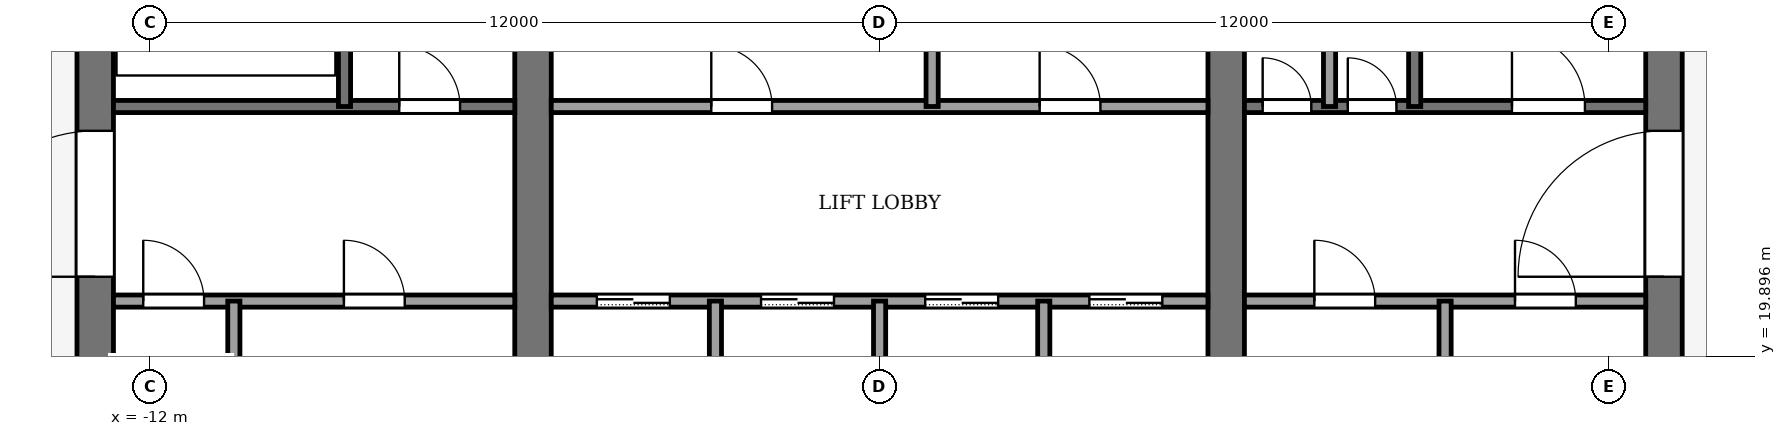
"""IFC4 building model, lengths in metres.
Left out: names, types, materials, properties, quantities, classifications, styles, units other than length and angle.
Written with IfcOpenShell. Run it as: python <this file> out.ifc"""

import sys

from ifc_helpers import new_model, si_unit, direction, frame, frame_2d, origin, place, context, subcontext, project, spatial, rectangle, extrude, element, fill, save


model = new_model("IFC4")
c1 = context("Model", 3, precision=1e-05, world=origin(), true_north=direction((0.0, 1.0)))
c2 = subcontext(c1, "Body", "Model", "MODEL_VIEW")
j1 = project(units=[si_unit("LENGTHUNIT", "METRE"), si_unit("PLANEANGLEUNIT", "RADIAN")], contexts=[c1])
p1 = place(None, origin())
s1 = spatial("IfcSite", under=j1, at=p1, CompositionType="ELEMENT")
p2 = place(p1, origin())
s2 = spatial("IfcBuilding", under=s1, at=p2, CompositionType="ELEMENT")
p3 = place(p2, frame((0.0, 0.0, 289.0)))
s3 = spatial("IfcBuildingStorey", under=s2, at=p3, CompositionType="ELEMENT", Elevation=289.0)
p4 = place(p3, frame((-12.9, 18.4, -0.13), z_axis=(0.0, 0.0, 1.0), x_axis=(0.0, 1.0, 0.0)))
e1 = element("IfcWall", 1, at=p4, inside=s3, PredefinedType="SHEAR", context=c2, shape_type="SweptSolid", body=[
    extrude(rectangle(XDim=19.2, YDim=0.6, at=frame_2d((9.6, 0.0))), origin(), (0.0, 0.0, 1.0), 5.0),
])
p5 = place(p4, frame((2.8, 0.0, 0.13)))
e2 = element("IfcOpeningElement", 2, at=p5, cuts=e1, PredefinedType="OPENING", context=c2, shape_type="SweptSolid", body=[
    extrude(rectangle(XDim=2.4, YDim=2.4, at=frame_2d((1.2, 1.2))), frame((0.0, 0.31, 0.0), z_axis=(0.0, -1.0, 0.0), x_axis=(1.0, 0.0, 0.0)), (0.0, 0.0, 1.0), 0.62),
])
p6 = place(p4, frame((13.4, 0.0, 0.13)))
e3 = element("IfcOpeningElement", 3, at=p6, cuts=e1, PredefinedType="OPENING", context=c2, shape_type="SweptSolid", body=[
    extrude(rectangle(XDim=1.4, YDim=2.2, at=frame_2d((0.7, 1.1))), frame((0.0, 0.31, 0.0), z_axis=(0.0, -1.0, 0.0), x_axis=(1.0, 0.0, 0.0)), (0.0, 0.0, 1.0), 0.62),
])
p7 = place(p3, frame((12.9, 18.4, -0.13), z_axis=(0.0, 0.0, 1.0), x_axis=(0.0, 1.0, 0.0)))
e4 = element("IfcWall", 4, at=p7, inside=s3, PredefinedType="SHEAR", context=c2, shape_type="SweptSolid", body=[
    extrude(rectangle(XDim=19.2, YDim=0.6, at=frame_2d((9.6, 0.0))), origin(), (0.0, 0.0, 1.0), 5.0),
])
p8 = place(p7, frame((2.8, 0.0, 0.13)))
e5 = element("IfcOpeningElement", 5, at=p8, cuts=e4, PredefinedType="OPENING", context=c2, shape_type="SweptSolid", body=[
    extrude(rectangle(XDim=2.4, YDim=2.4, at=frame_2d((1.2, 1.2))), frame((0.0, 0.31, 0.0), z_axis=(0.0, -1.0, 0.0), x_axis=(1.0, 0.0, 0.0)), (0.0, 0.0, 1.0), 0.62),
])
p9 = place(p7, frame((13.3, 0.0, 0.13)))
e6 = element("IfcOpeningElement", 6, at=p9, cuts=e4, PredefinedType="OPENING", context=c2, shape_type="SweptSolid", body=[
    extrude(rectangle(XDim=2.4, YDim=2.4, at=frame_2d((1.2, 1.2))), frame((0.0, 0.31, 0.0), z_axis=(0.0, -1.0, 0.0), x_axis=(1.0, 0.0, 0.0)), (0.0, 0.0, 1.0), 0.62),
])
p10 = place(p3, frame((-5.7, 18.4, -0.13), z_axis=(0.0, 0.0, 1.0), x_axis=(0.0, 1.0, 0.0)))
e7 = element("IfcWall", 7, at=p10, inside=s3, PredefinedType="SHEAR", context=c2, shape_type="SweptSolid", body=[
    extrude(rectangle(XDim=19.2, YDim=0.6, at=frame_2d((9.6, 0.0))), origin(), (0.0, 0.0, 1.0), 5.0),
])
p11 = place(p10, frame((8.35, 0.0, 0.13)))
e8 = element("IfcOpeningElement", 8, at=p11, cuts=e7, PredefinedType="OPENING", context=c2, shape_type="SweptSolid", body=[
    extrude(rectangle(XDim=0.9, YDim=2.1, at=frame_2d((0.45, 1.05))), frame((0.0, 0.31, 0.0), z_axis=(0.0, -1.0, 0.0), x_axis=(1.0, 0.0, 0.0)), (0.0, 0.0, 1.0), 0.62),
])
p12 = place(p3, frame((5.7, 18.4, -0.13), z_axis=(0.0, 0.0, 1.0), x_axis=(0.0, 1.0, 0.0)))
e9 = element("IfcWall", 9, at=p12, inside=s3, PredefinedType="SHEAR", context=c2, shape_type="SweptSolid", body=[
    extrude(rectangle(XDim=19.2, YDim=0.6, at=frame_2d((9.6, 0.0))), origin(), (0.0, 0.0, 1.0), 5.0),
])
p13 = place(p12, frame((13.3, 0.0, 0.13)))
e10 = element("IfcOpeningElement", 10, at=p13, cuts=e9, PredefinedType="OPENING", context=c2, shape_type="SweptSolid", body=[
    extrude(rectangle(XDim=2.4, YDim=2.4, at=frame_2d((1.2, 1.2))), frame((0.0, 0.31, 0.0), z_axis=(0.0, -1.0, 0.0), x_axis=(1.0, 0.0, 0.0)), (0.0, 0.0, 1.0), 0.62),
])
p14 = place(p3, frame((-12.6, 20.8, 0.0), z_axis=(0.0, 0.0, 1.0), x_axis=(1.0, 0.0, 0.0)))
e11 = element("IfcWall", 11, at=p14, inside=s3, PredefinedType="PARTITIONING", context=c2, shape_type="SweptSolid", body=[
    extrude(rectangle(XDim=6.6, YDim=0.2, at=frame_2d((3.3, 0.0))), origin(), (0.0, 0.0, 1.0), 4.87),
])
p15 = place(p14, frame((0.49, 0.0, 0.0)))
e12 = element("IfcOpeningElement", 12, at=p15, cuts=e11, PredefinedType="OPENING", context=c2, shape_type="SweptSolid", body=[
    extrude(rectangle(XDim=1.0, YDim=2.1, at=frame_2d((0.5, 1.05))), frame((0.0, 0.11, 0.0), z_axis=(0.0, -1.0, 0.0), x_axis=(1.0, 0.0, 0.0)), (0.0, 0.0, 1.0), 0.22),
])
p16 = place(p14, frame((3.79, 0.0, 0.0)))
e13 = element("IfcOpeningElement", 13, at=p16, cuts=e11, PredefinedType="OPENING", context=c2, shape_type="SweptSolid", body=[
    extrude(rectangle(XDim=1.0, YDim=2.1, at=frame_2d((0.5, 1.05))), frame((0.0, 0.11, 0.0), z_axis=(0.0, -1.0, 0.0), x_axis=(1.0, 0.0, 0.0)), (0.0, 0.0, 1.0), 0.22),
])
p17 = place(p3, frame((-5.4, 20.8, 0.0), z_axis=(0.0, 0.0, 1.0), x_axis=(1.0, 0.0, 0.0)))
e14 = element("IfcWall", 14, at=p17, inside=s3, PredefinedType="PARTITIONING", context=c2, shape_type="SweptSolid", body=[
    extrude(rectangle(XDim=10.8, YDim=0.2, at=frame_2d((5.4, 0.0))), origin(), (0.0, 0.0, 1.0), 4.87),
])
p18 = place(p17, frame((0.75, 0.0, 0.0)))
e15 = element("IfcOpeningElement", 15, at=p18, cuts=e14, PredefinedType="OPENING", context=c2, shape_type="SweptSolid", body=[
    extrude(rectangle(XDim=1.2, YDim=2.2, at=frame_2d((0.6, 1.1))), frame((0.0, 0.11, 0.0), z_axis=(0.0, -1.0, 0.0), x_axis=(1.0, 0.0, 0.0)), (0.0, 0.0, 1.0), 0.22),
])
p19 = place(p17, frame((3.45, 0.0, 0.0)))
e16 = element("IfcOpeningElement", 16, at=p19, cuts=e14, PredefinedType="OPENING", context=c2, shape_type="SweptSolid", body=[
    extrude(rectangle(XDim=1.2, YDim=2.2, at=frame_2d((0.6, 1.1))), frame((0.0, 0.11, 0.0), z_axis=(0.0, -1.0, 0.0), x_axis=(1.0, 0.0, 0.0)), (0.0, 0.0, 1.0), 0.22),
])
p20 = place(p17, frame((6.15, 0.0, 0.0)))
e17 = element("IfcOpeningElement", 17, at=p20, cuts=e14, PredefinedType="OPENING", context=c2, shape_type="SweptSolid", body=[
    extrude(rectangle(XDim=1.2, YDim=2.2, at=frame_2d((0.6, 1.1))), frame((0.0, 0.11, 0.0), z_axis=(0.0, -1.0, 0.0), x_axis=(1.0, 0.0, 0.0)), (0.0, 0.0, 1.0), 0.22),
])
p21 = place(p17, frame((8.85, 0.0, 0.0)))
e18 = element("IfcOpeningElement", 18, at=p21, cuts=e14, PredefinedType="OPENING", context=c2, shape_type="SweptSolid", body=[
    extrude(rectangle(XDim=1.2, YDim=2.2, at=frame_2d((0.6, 1.1))), frame((0.0, 0.11, 0.0), z_axis=(0.0, -1.0, 0.0), x_axis=(1.0, 0.0, 0.0)), (0.0, 0.0, 1.0), 0.22),
])
p22 = place(p3, frame((6.0, 20.8, 0.0), z_axis=(0.0, 0.0, 1.0), x_axis=(1.0, 0.0, 0.0)))
e19 = element("IfcWall", 19, at=p22, inside=s3, PredefinedType="PARTITIONING", context=c2, shape_type="SweptSolid", body=[
    extrude(rectangle(XDim=6.6, YDim=0.2, at=frame_2d((3.3, 0.0))), origin(), (0.0, 0.0, 1.0), 4.87),
])
p23 = place(p22, frame((1.15, 0.0, 0.0)))
e20 = element("IfcOpeningElement", 20, at=p23, cuts=e19, PredefinedType="OPENING", context=c2, shape_type="SweptSolid", body=[
    extrude(rectangle(XDim=1.0, YDim=2.1, at=frame_2d((0.5, 1.05))), frame((0.0, 0.11, 0.0), z_axis=(0.0, -1.0, 0.0), x_axis=(1.0, 0.0, 0.0)), (0.0, 0.0, 1.0), 0.22),
])
p24 = place(p22, frame((4.45, 0.0, 0.0)))
e21 = element("IfcOpeningElement", 21, at=p24, cuts=e19, PredefinedType="OPENING", context=c2, shape_type="SweptSolid", body=[
    extrude(rectangle(XDim=1.0, YDim=2.1, at=frame_2d((0.5, 1.05))), frame((0.0, 0.11, 0.0), z_axis=(0.0, -1.0, 0.0), x_axis=(1.0, 0.0, 0.0)), (0.0, 0.0, 1.0), 0.22),
])
p25 = place(p3, frame((-12.6, 24.0, 0.0), z_axis=(0.0, 0.0, 1.0), x_axis=(1.0, 0.0, 0.0)))
e22 = element("IfcWall", 22, at=p25, inside=s3, PredefinedType="PARTITIONING", context=c2, shape_type="SweptSolid", body=[
    extrude(rectangle(XDim=6.6, YDim=0.2, at=frame_2d((3.3, 0.0))), origin(), (0.0, 0.0, 1.0), 4.87),
])
p26 = place(p25, frame((4.7, 0.0, 0.0)))
e23 = element("IfcOpeningElement", 23, at=p26, cuts=e22, PredefinedType="OPENING", context=c2, shape_type="SweptSolid", body=[
    extrude(rectangle(XDim=1.0, YDim=2.1, at=frame_2d((0.5, 1.05))), frame((0.0, 0.11, 0.0), z_axis=(0.0, -1.0, 0.0), x_axis=(1.0, 0.0, 0.0)), (0.0, 0.0, 1.0), 0.22),
])
p27 = place(p3, frame((-5.4, 24.0, 0.0), z_axis=(0.0, 0.0, 1.0), x_axis=(1.0, 0.0, 0.0)))
e24 = element("IfcWall", 24, at=p27, inside=s3, PredefinedType="PARTITIONING", context=c2, shape_type="SweptSolid", body=[
    extrude(rectangle(XDim=10.8, YDim=0.2, at=frame_2d((5.4, 0.0))), origin(), (0.0, 0.0, 1.0), 4.87),
])
p28 = place(p27, frame((2.632, 0.0, 0.0)))
e25 = element("IfcOpeningElement", 25, at=p28, cuts=e24, PredefinedType="OPENING", context=c2, shape_type="SweptSolid", body=[
    extrude(rectangle(XDim=1.0, YDim=2.1, at=frame_2d((0.5, 1.05))), frame((0.0, 0.11, 0.0), z_axis=(0.0, -1.0, 0.0), x_axis=(1.0, 0.0, 0.0)), (0.0, 0.0, 1.0), 0.22),
])
p29 = place(p27, frame((8.032, 0.0, 0.0)))
e26 = element("IfcOpeningElement", 26, at=p29, cuts=e24, PredefinedType="OPENING", context=c2, shape_type="SweptSolid", body=[
    extrude(rectangle(XDim=1.0, YDim=2.1, at=frame_2d((0.5, 1.05))), frame((0.0, 0.11, 0.0), z_axis=(0.0, -1.0, 0.0), x_axis=(1.0, 0.0, 0.0)), (0.0, 0.0, 1.0), 0.22),
])
p30 = place(p3, frame((6.0, 24.0, 0.0), z_axis=(0.0, 0.0, 1.0), x_axis=(1.0, 0.0, 0.0)))
e27 = element("IfcWall", 27, at=p30, inside=s3, PredefinedType="PARTITIONING", context=c2, shape_type="SweptSolid", body=[
    extrude(rectangle(XDim=6.6, YDim=0.2, at=frame_2d((3.3, 0.0))), origin(), (0.0, 0.0, 1.0), 4.87),
])
p31 = place(p30, frame((0.3, 0.0, 0.0)))
e28 = element("IfcOpeningElement", 28, at=p31, cuts=e27, PredefinedType="OPENING", context=c2, shape_type="SweptSolid", body=[
    extrude(rectangle(XDim=0.8, YDim=2.1, at=frame_2d((0.4, 1.05))), frame((0.0, 0.11, 0.0), z_axis=(0.0, -1.0, 0.0), x_axis=(1.0, 0.0, 0.0)), (0.0, 0.0, 1.0), 0.22),
])
p32 = place(p30, frame((1.7, 0.0, 0.0)))
e29 = element("IfcOpeningElement", 29, at=p32, cuts=e27, PredefinedType="OPENING", context=c2, shape_type="SweptSolid", body=[
    extrude(rectangle(XDim=0.8, YDim=2.1, at=frame_2d((0.4, 1.05))), frame((0.0, 0.11, 0.0), z_axis=(0.0, -1.0, 0.0), x_axis=(1.0, 0.0, 0.0)), (0.0, 0.0, 1.0), 0.22),
])
p33 = place(p30, frame((4.4, 0.0, 0.0)))
e30 = element("IfcOpeningElement", 30, at=p33, cuts=e27, PredefinedType="OPENING", context=c2, shape_type="SweptSolid", body=[
    extrude(rectangle(XDim=1.2, YDim=2.2, at=frame_2d((0.6, 1.1))), frame((0.0, 0.11, 0.0), z_axis=(0.0, -1.0, 0.0), x_axis=(1.0, 0.0, 0.0)), (0.0, 0.0, 1.0), 0.22),
])
p34 = place(p3, frame((-10.62, 18.4, 0.0), z_axis=(0.0, 0.0, 1.0), x_axis=(0.0, 1.0, 0.0)))
e31 = element("IfcWall", 31, at=p34, inside=s3, PredefinedType="PARTITIONING", context=c2, shape_type="SweptSolid", body=[
    extrude(rectangle(XDim=2.4, YDim=0.2, at=frame_2d((1.2, 0.0))), origin(), (0.0, 0.0, 1.0), 4.87),
])
p35 = place(p3, frame((-8.8, 24.0, 0.0), z_axis=(0.0, 0.0, 1.0), x_axis=(0.0, 1.0, 0.0)))
e32 = element("IfcWall", 32, at=p35, inside=s3, PredefinedType="PARTITIONING", context=c2, shape_type="SweptSolid", body=[
    extrude(rectangle(XDim=7.4, YDim=0.2, at=frame_2d((3.7, 0.0))), origin(), (0.0, 0.0, 1.0), 4.87),
])
for number, where, z_axis, x_axis in (
    (33, (-2.7, 18.4, 0.0), (0.0, 0.0, 1.0), (0.0, 1.0, 0.0)),
    (34, (0.0, 18.4, 0.0), (0.0, 0.0, 1.0), (0.0, 1.0, 0.0)),
):
    element("IfcWall", number, at=place(p3, frame(where, z_axis=z_axis, x_axis=x_axis)), inside=s3, PredefinedType="PARTITIONING", context=c2, shape_type="SweptSolid", body=[
        extrude(rectangle(XDim=2.4, YDim=0.2, at=frame_2d((1.2, 0.0))), origin(), (0.0, 0.0, 1.0), 4.87),
    ])
p36 = place(p3, frame((0.864, 24.0, 0.0), z_axis=(0.0, 0.0, 1.0), x_axis=(0.0, 1.0, 0.0)))
e35 = element("IfcWall", 35, at=p36, inside=s3, PredefinedType="PARTITIONING", context=c2, shape_type="SweptSolid", body=[
    extrude(rectangle(XDim=2.4, YDim=0.2, at=frame_2d((1.2, 0.0))), origin(), (0.0, 0.0, 1.0), 4.87),
])
p37 = place(p3, frame((2.7, 18.4, 0.0), z_axis=(0.0, 0.0, 1.0), x_axis=(0.0, 1.0, 0.0)))
e36 = element("IfcWall", 36, at=p37, inside=s3, PredefinedType="PARTITIONING", context=c2, shape_type="SweptSolid", body=[
    extrude(rectangle(XDim=2.4, YDim=0.2, at=frame_2d((1.2, 0.0))), origin(), (0.0, 0.0, 1.0), 4.87),
])
for number, where, z_axis, x_axis in (
    (37, (7.4, 24.0, 0.0), (0.0, 0.0, 1.0), (0.0, 1.0, 0.0)),
    (38, (8.8, 24.0, 0.0), (0.0, 0.0, 1.0), (0.0, 1.0, 0.0)),
):
    element("IfcWall", number, at=place(p3, frame(where, z_axis=z_axis, x_axis=x_axis)), inside=s3, PredefinedType="PARTITIONING", context=c2, shape_type="SweptSolid", body=[
        extrude(rectangle(XDim=7.4, YDim=0.2, at=frame_2d((3.7, 0.0))), origin(), (0.0, 0.0, 1.0), 4.87),
    ])
p38 = place(p3, frame((9.3, 18.4, 0.0), z_axis=(0.0, 0.0, 1.0), x_axis=(0.0, 1.0, 0.0)))
e39 = element("IfcWall", 39, at=p38, inside=s3, PredefinedType="PARTITIONING", context=c2, shape_type="SweptSolid", body=[
    extrude(rectangle(XDim=2.4, YDim=0.2, at=frame_2d((1.2, 0.0))), origin(), (0.0, 0.0, 1.0), 4.87),
])
p39 = place(p18, origin())
e40 = element("IfcDoor", 40, at=p39, inside=s3, OperationType="SLIDING_TO_LEFT", PredefinedType="DOOR", context=c2, shape_type="SweptSolid", body=[
    extrude(rectangle(XDim=1.2, YDim=2.2, at=frame_2d((0.6, 1.1))), frame((0.0, 0.025, 0.0), z_axis=(0.0, -1.0, 0.0), x_axis=(1.0, 0.0, 0.0)), (0.0, 0.0, 1.0), 0.05),
])
fill(e15, e40)
p40 = place(p19, origin())
e41 = element("IfcDoor", 41, at=p40, inside=s3, OperationType="SLIDING_TO_LEFT", PredefinedType="DOOR", context=c2, shape_type="SweptSolid", body=[
    extrude(rectangle(XDim=1.2, YDim=2.2, at=frame_2d((0.6, 1.1))), frame((0.0, 0.025, 0.0), z_axis=(0.0, -1.0, 0.0), x_axis=(1.0, 0.0, 0.0)), (0.0, 0.0, 1.0), 0.05),
])
fill(e16, e41)
p41 = place(p20, origin())
e42 = element("IfcDoor", 42, at=p41, inside=s3, OperationType="SLIDING_TO_LEFT", PredefinedType="DOOR", context=c2, shape_type="SweptSolid", body=[
    extrude(rectangle(XDim=1.2, YDim=2.2, at=frame_2d((0.6, 1.1))), frame((0.0, 0.025, 0.0), z_axis=(0.0, -1.0, 0.0), x_axis=(1.0, 0.0, 0.0)), (0.0, 0.0, 1.0), 0.05),
])
fill(e17, e42)
p42 = place(p21, origin())
e43 = element("IfcDoor", 43, at=p42, inside=s3, OperationType="SLIDING_TO_LEFT", PredefinedType="DOOR", context=c2, shape_type="SweptSolid", body=[
    extrude(rectangle(XDim=1.2, YDim=2.2, at=frame_2d((0.6, 1.1))), frame((0.0, 0.025, 0.0), z_axis=(0.0, -1.0, 0.0), x_axis=(1.0, 0.0, 0.0)), (0.0, 0.0, 1.0), 0.05),
])
fill(e18, e43)
p43 = place(p28, origin())
e44 = element("IfcDoor", 44, at=p43, inside=s3, OperationType="SINGLE_SWING_LEFT", PredefinedType="DOOR", context=c2, shape_type="SweptSolid", body=[
    extrude(rectangle(XDim=1.0, YDim=2.1, at=frame_2d((0.5, 1.05))), frame((0.0, 0.025, 0.0), z_axis=(0.0, -1.0, 0.0), x_axis=(1.0, 0.0, 0.0)), (0.0, 0.0, 1.0), 0.05),
])
fill(e25, e44)
p44 = place(p29, origin())
e45 = element("IfcDoor", 45, at=p44, inside=s3, OperationType="SINGLE_SWING_RIGHT", PredefinedType="DOOR", context=c2, shape_type="SweptSolid", body=[
    extrude(rectangle(XDim=1.0, YDim=2.1, at=frame_2d((0.5, 1.05))), frame((0.0, 0.025, 0.0), z_axis=(0.0, -1.0, 0.0), x_axis=(1.0, 0.0, 0.0)), (0.0, 0.0, 1.0), 0.05),
])
fill(e26, e45)
p45 = place(p15, origin())
e46 = element("IfcDoor", 46, at=p45, inside=s3, OperationType="SINGLE_SWING_RIGHT", PredefinedType="DOOR", context=c2, shape_type="SweptSolid", body=[
    extrude(rectangle(XDim=1.0, YDim=2.1, at=frame_2d((0.5, 1.05))), frame((0.0, 0.025, 0.0), z_axis=(0.0, -1.0, 0.0), x_axis=(1.0, 0.0, 0.0)), (0.0, 0.0, 1.0), 0.05),
])
fill(e12, e46)
p46 = place(p16, origin())
e47 = element("IfcDoor", 47, at=p46, inside=s3, OperationType="SINGLE_SWING_RIGHT", PredefinedType="DOOR", context=c2, shape_type="SweptSolid", body=[
    extrude(rectangle(XDim=1.0, YDim=2.1, at=frame_2d((0.5, 1.05))), frame((0.0, 0.025, 0.0), z_axis=(0.0, -1.0, 0.0), x_axis=(1.0, 0.0, 0.0)), (0.0, 0.0, 1.0), 0.05),
])
fill(e13, e47)
p47 = place(p23, origin())
e48 = element("IfcDoor", 48, at=p47, inside=s3, OperationType="SINGLE_SWING_LEFT", PredefinedType="DOOR", context=c2, shape_type="SweptSolid", body=[
    extrude(rectangle(XDim=1.0, YDim=2.1, at=frame_2d((0.5, 1.05))), frame((0.0, 0.025, 0.0), z_axis=(0.0, -1.0, 0.0), x_axis=(1.0, 0.0, 0.0)), (0.0, 0.0, 1.0), 0.05),
])
fill(e20, e48)
p48 = place(p24, origin())
e49 = element("IfcDoor", 49, at=p48, inside=s3, OperationType="SINGLE_SWING_LEFT", PredefinedType="DOOR", context=c2, shape_type="SweptSolid", body=[
    extrude(rectangle(XDim=1.0, YDim=2.1, at=frame_2d((0.5, 1.05))), frame((0.0, 0.025, 0.0), z_axis=(0.0, -1.0, 0.0), x_axis=(1.0, 0.0, 0.0)), (0.0, 0.0, 1.0), 0.05),
])
fill(e21, e49)
p49 = place(p26, origin())
e50 = element("IfcDoor", 50, at=p49, inside=s3, OperationType="SINGLE_SWING_RIGHT", PredefinedType="DOOR", context=c2, shape_type="SweptSolid", body=[
    extrude(rectangle(XDim=1.0, YDim=2.1, at=frame_2d((0.5, 1.05))), frame((0.0, 0.025, 0.0), z_axis=(0.0, -1.0, 0.0), x_axis=(1.0, 0.0, 0.0)), (0.0, 0.0, 1.0), 0.05),
])
fill(e23, e50)
p50 = place(p31, origin())
e51 = element("IfcDoor", 51, at=p50, inside=s3, OperationType="SINGLE_SWING_RIGHT", PredefinedType="DOOR", context=c2, shape_type="SweptSolid", body=[
    extrude(rectangle(XDim=0.8, YDim=2.1, at=frame_2d((0.4, 1.05))), frame((0.0, 0.025, 0.0), z_axis=(0.0, -1.0, 0.0), x_axis=(1.0, 0.0, 0.0)), (0.0, 0.0, 1.0), 0.05),
])
fill(e28, e51)
p51 = place(p32, origin())
e52 = element("IfcDoor", 52, at=p51, inside=s3, OperationType="SINGLE_SWING_LEFT", PredefinedType="DOOR", context=c2, shape_type="SweptSolid", body=[
    extrude(rectangle(XDim=0.8, YDim=2.1, at=frame_2d((0.4, 1.05))), frame((0.0, 0.025, 0.0), z_axis=(0.0, -1.0, 0.0), x_axis=(1.0, 0.0, 0.0)), (0.0, 0.0, 1.0), 0.05),
])
fill(e29, e52)
p52 = place(p33, origin())
e53 = element("IfcDoor", 53, at=p52, inside=s3, OperationType="SINGLE_SWING_RIGHT", PredefinedType="DOOR", context=c2, shape_type="SweptSolid", body=[
    extrude(rectangle(XDim=1.2, YDim=2.2, at=frame_2d((0.6, 1.1))), frame((0.0, 0.025, 0.0), z_axis=(0.0, -1.0, 0.0), x_axis=(1.0, 0.0, 0.0)), (0.0, 0.0, 1.0), 0.05),
])
fill(e30, e53)
p53 = place(p5, origin())
e54 = element("IfcDoor", 54, at=p53, inside=s3, OperationType="DOUBLE_DOOR_SINGLE_SWING", PredefinedType="DOOR", context=c2, shape_type="SweptSolid", body=[
    extrude(rectangle(XDim=2.4, YDim=2.4, at=frame_2d((1.2, 1.2))), frame((0.0, 0.025, 0.0), z_axis=(0.0, -1.0, 0.0), x_axis=(1.0, 0.0, 0.0)), (0.0, 0.0, 1.0), 0.05),
])
fill(e2, e54)
p54 = place(p8, origin())
e55 = element("IfcDoor", 55, at=p54, inside=s3, OperationType="DOUBLE_DOOR_SINGLE_SWING", PredefinedType="DOOR", context=c2, shape_type="SweptSolid", body=[
    extrude(rectangle(XDim=2.4, YDim=2.4, at=frame_2d((1.2, 1.2))), frame((0.0, 0.025, 0.0), z_axis=(0.0, -1.0, 0.0), x_axis=(1.0, 0.0, 0.0)), (0.0, 0.0, 1.0), 0.05),
])
fill(e5, e55)
save(model, sys.argv[1])
